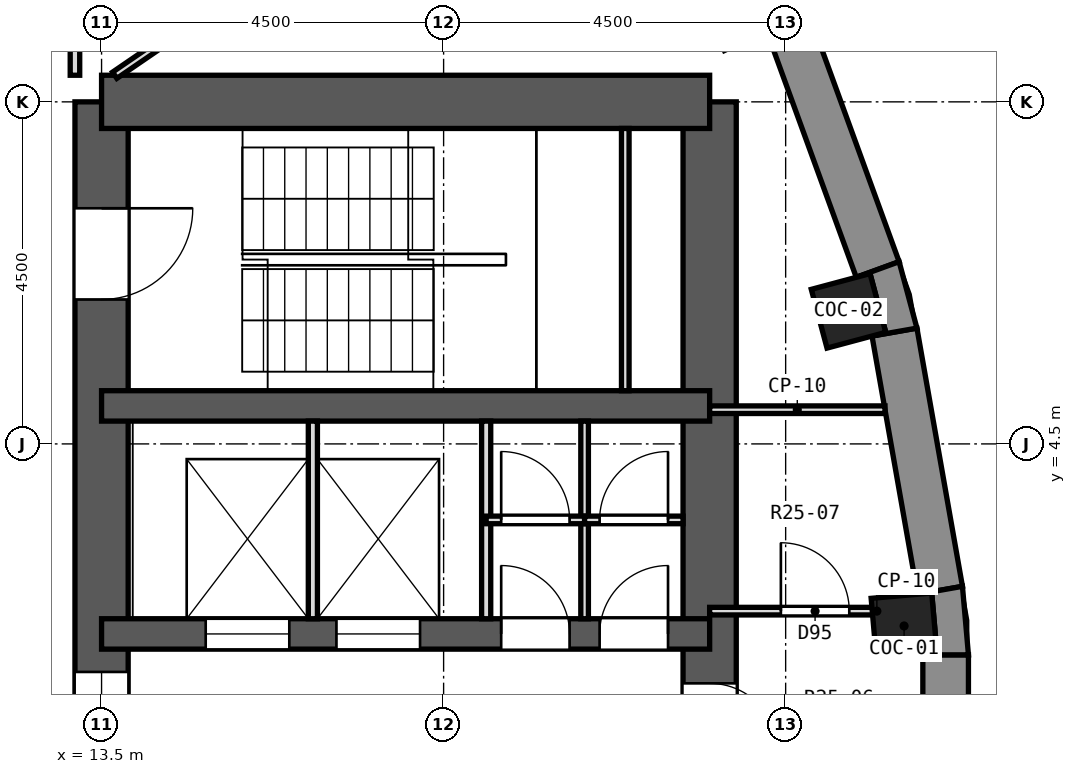
"""IFC4 building model, lengths in metres.
Left out: names, types, materials, properties, quantities, classifications, styles, units other than length and angle.
Written with IfcOpenShell. Run it as: python <this file> out.ifc"""

import sys

from ifc_helpers import new_model, si_unit, direction, frame, frame_2d, origin, origin_2d, place, context, subcontext, project, spatial, polyline, rectangle, outline, extrude, element, fill, save


model = new_model("IFC4")
c1 = context("Model", 3, precision=1e-05, world=origin(), true_north=direction((0.0, 1.0)))
c2 = subcontext(c1, "Body", "Model", "MODEL_VIEW")
j1 = project(units=[si_unit("LENGTHUNIT", "METRE"), si_unit("PLANEANGLEUNIT", "RADIAN")], contexts=[c1])
p1 = place(None, origin())
s1 = spatial("IfcSite", under=j1, at=p1, CompositionType="ELEMENT")
p2 = place(p1, origin())
s2 = spatial("IfcBuilding", under=s1, at=p2, CompositionType="ELEMENT")
p3 = place(p2, frame((0.0, 0.0, 160.8)))
s3 = spatial("IfcBuildingStorey", under=s2, at=p3, CompositionType="ELEMENT", Elevation=160.8)
for number, where, z_axis, x_axis in (
    (1, (24.058, 2.105, 0.0), (0.0, 0.0, 1.0), (0.996, 0.087, 0.0)),
    (2, (23.327, 6.25, 0.0), (0.0, 0.0, 1.0), (0.966, 0.259, 0.0)),
):
    element("IfcColumn", number, at=place(p3, frame(where, z_axis=z_axis, x_axis=x_axis)), inside=s3, PredefinedType="COLUMN", context=c2, shape_type="SweptSolid", body=[
        extrude(rectangle(XDim=0.8, YDim=0.8, at=origin_2d()), origin(), (0.0, 0.0, 1.0), 3.3),
    ])
p4 = place(p3, frame((13.5, -9.0, 0.0), z_axis=(0.0, 0.0, 1.0), x_axis=(0.0, 1.0, 0.0)))
e3 = element("IfcWall", 3, at=p4, inside=s3, PredefinedType="SHEAR", context=c2, shape_type="SweptSolid", body=[
    extrude(rectangle(XDim=18.0, YDim=0.7, at=frame_2d((9.0, 0.0))), origin(), (0.0, 0.0, 1.0), 3.3),
])
p5 = place(p4, frame((15.4, 0.0, 0.0)))
e4 = element("IfcOpeningElement", 4, at=p5, cuts=e3, PredefinedType="OPENING", context=c2, shape_type="SweptSolid", body=[
    extrude(rectangle(XDim=1.2, YDim=2.1, at=frame_2d((0.6, 1.05))), frame((0.0, 0.362, 0.0), z_axis=(0.0, -1.0, 0.0), x_axis=(1.0, 0.0, 0.0)), (0.0, 0.0, 1.0), 0.724),
])
p6 = place(p4, frame((1.4, 0.0, 0.0)))
e5 = element("IfcOpeningElement", 5, at=p6, cuts=e3, PredefinedType="OPENING", context=c2, shape_type="SweptSolid", body=[
    extrude(rectangle(XDim=1.2, YDim=2.1, at=frame_2d((0.6, 1.05))), frame((0.0, 0.362, 0.0), z_axis=(0.0, -1.0, 0.0), x_axis=(1.0, 0.0, 0.0)), (0.0, 0.0, 1.0), 0.724),
])
p7 = place(p4, frame((7.5, 0.0, 0.0)))
e6 = element("IfcOpeningElement", 6, at=p7, cuts=e3, PredefinedType="OPENING", context=c2, shape_type="SweptSolid", body=[
    extrude(rectangle(XDim=3.0, YDim=2.4, at=frame_2d((1.5, 1.2))), frame((0.0, 0.362, 0.0), z_axis=(0.0, -1.0, 0.0), x_axis=(1.0, 0.0, 0.0)), (0.0, 0.0, 1.0), 0.724),
])
p8 = place(p3, frame((21.5, -9.0, 0.0), z_axis=(0.0, 0.0, 1.0), x_axis=(0.0, 1.0, 0.0)))
e7 = element("IfcWall", 7, at=p8, inside=s3, PredefinedType="SHEAR", context=c2, shape_type="SweptSolid", body=[
    extrude(rectangle(XDim=18.0, YDim=0.7, at=frame_2d((9.0, 0.0))), origin(), (0.0, 0.0, 1.0), 3.3),
])
p9 = place(p8, frame((9.45, 0.0, 0.0)))
e8 = element("IfcOpeningElement", 8, at=p9, cuts=e7, PredefinedType="OPENING", context=c2, shape_type="SweptSolid", body=[
    extrude(rectangle(XDim=0.9, YDim=2.1, at=frame_2d((0.45, 1.05))), frame((0.0, 0.362, 0.0), z_axis=(0.0, -1.0, 0.0), x_axis=(1.0, 0.0, 0.0)), (0.0, 0.0, 1.0), 0.724),
])
p10 = place(p8, frame((7.65, 0.0, 0.0)))
e9 = element("IfcOpeningElement", 9, at=p10, cuts=e7, PredefinedType="OPENING", context=c2, shape_type="SweptSolid", body=[
    extrude(rectangle(XDim=0.9, YDim=2.1, at=frame_2d((0.45, 1.05))), frame((0.0, 0.362, 0.0), z_axis=(0.0, -1.0, 0.0), x_axis=(1.0, 0.0, 0.0)), (0.0, 0.0, 1.0), 0.724),
])
p11 = place(p3, frame((13.5, 9.0, 0.0), z_axis=(0.0, 0.0, 1.0), x_axis=(1.0, 0.0, 0.0)))
e10 = element("IfcWall", 10, at=p11, inside=s3, PredefinedType="SHEAR", context=c2, shape_type="SweptSolid", body=[
    extrude(rectangle(XDim=8.0, YDim=0.7, at=frame_2d((4.0, 0.0))), origin(), (0.0, 0.0, 1.0), 3.3),
])
p12 = place(p3, frame((13.5, 5.0, 0.0), z_axis=(0.0, 0.0, 1.0), x_axis=(1.0, 0.0, 0.0)))
e11 = element("IfcWall", 11, at=p12, inside=s3, PredefinedType="SHEAR", context=c2, shape_type="SweptSolid", body=[
    extrude(rectangle(XDim=8.0, YDim=0.4, at=frame_2d((4.0, 0.0))), origin(), (0.0, 0.0, 1.0), 3.3),
])
p13 = place(p3, frame((13.5, 2.0, 0.0), z_axis=(0.0, 0.0, 1.0), x_axis=(1.0, 0.0, 0.0)))
e12 = element("IfcWall", 12, at=p13, inside=s3, PredefinedType="SHEAR", context=c2, shape_type="SweptSolid", body=[
    extrude(rectangle(XDim=8.0, YDim=0.4, at=frame_2d((4.0, 0.0))), origin(), (0.0, 0.0, 1.0), 3.3),
])
p14 = place(p13, frame((1.37, 0.0, 0.0)))
e13 = element("IfcOpeningElement", 13, at=p14, cuts=e12, PredefinedType="OPENING", context=c2, shape_type="SweptSolid", body=[
    extrude(rectangle(XDim=1.1, YDim=2.1, at=frame_2d((0.55, 1.05))), frame((0.0, 0.212, 0.0), z_axis=(0.0, -1.0, 0.0), x_axis=(1.0, 0.0, 0.0)), (0.0, 0.0, 1.0), 0.424),
])
p15 = place(p13, frame((3.09, 0.0, 0.0)))
e14 = element("IfcOpeningElement", 14, at=p15, cuts=e12, PredefinedType="OPENING", context=c2, shape_type="SweptSolid", body=[
    extrude(rectangle(XDim=1.1, YDim=2.1, at=frame_2d((0.55, 1.05))), frame((0.0, 0.212, 0.0), z_axis=(0.0, -1.0, 0.0), x_axis=(1.0, 0.0, 0.0)), (0.0, 0.0, 1.0), 0.424),
])
p16 = place(p13, frame((5.258, 0.0, 0.0)))
e15 = element("IfcOpeningElement", 15, at=p16, cuts=e12, PredefinedType="OPENING", context=c2, shape_type="SweptSolid", body=[
    extrude(rectangle(XDim=0.9, YDim=2.1, at=frame_2d((0.45, 1.05))), frame((0.0, 0.212, 0.0), z_axis=(0.0, -1.0, 0.0), x_axis=(1.0, 0.0, 0.0)), (0.0, 0.0, 1.0), 0.424),
])
p17 = place(p13, frame((6.552, 0.0, 0.0)))
e16 = element("IfcOpeningElement", 16, at=p17, cuts=e12, PredefinedType="OPENING", context=c2, shape_type="SweptSolid", body=[
    extrude(rectangle(XDim=0.9, YDim=2.1, at=frame_2d((0.45, 1.05))), frame((0.0, 0.212, 0.0), z_axis=(0.0, -1.0, 0.0), x_axis=(1.0, 0.0, 0.0)), (0.0, 0.0, 1.0), 0.424),
])
for number, where, z_axis, x_axis in (
    (17, (24.531, 2.574, 0.0), (0.0, 0.0, 1.0), (-0.174, 0.985, 0.0)),
    (18, (23.711, 6.794, 0.0), (0.0, 0.0, 1.0), (-0.342, 0.94, 0.0)),
    (19, (24.605, -1.725, 0.0), (0.0, 0.0, 1.0), (0.0, 1.0, 0.0)),
):
    element("IfcWall", number, at=place(p3, frame(where, z_axis=z_axis, x_axis=x_axis)), inside=s3, PredefinedType="SOLIDWALL", context=c2, shape_type="SweptSolid", body=[
        extrude(rectangle(XDim=3.45, YDim=0.6, at=frame_2d((1.725, 0.0))), origin(), (0.0, 0.0, 1.0), 2.85),
    ])
p18 = place(p3, origin())
e20 = element("IfcWall", 20, at=p18, inside=s3, PredefinedType="SOLIDWALL", context=c2, shape_type="SweptSolid", body=[
    extrude(outline(polyline([(24.905, 1.725), (24.826, 2.626), (24.235, 2.522), (24.422, 2.538), (24.491, 1.741), (24.305, 1.725), (24.905, 1.725)])), origin(), (0.0, 0.0, 1.0), 2.85),
])
p19 = place(p3, origin())
e21 = element("IfcWall", 21, at=p19, inside=s3, PredefinedType="SOLIDWALL", context=c2, shape_type="SweptSolid", body=[
    extrude(outline(polyline([(24.227, 6.023), (23.993, 6.897), (23.429, 6.692), (23.61, 6.74), (23.817, 5.968), (23.636, 5.919), (24.227, 6.023)])), origin(), (0.0, 0.0, 1.0), 2.85),
])
p20 = place(p3, frame((13.673, 9.35, 0.0), z_axis=(0.0, 0.0, 1.0), x_axis=(0.82545226585, 0.564471927382, 0.0)))
e22 = element("IfcWall", 22, at=p20, inside=s3, PredefinedType="PARTITIONING", context=c2, shape_type="SweptSolid", body=[
    extrude(rectangle(XDim=2.395, YDim=0.1, at=frame_2d((1.197, 0.0))), origin(), (0.0, 0.0, 1.0), 2.85),
])
p21 = place(p3, frame((13.15, 9.35, 0.0), z_axis=(0.0, 0.0, 1.0), x_axis=(0.0, 1.0, 0.0)))
e23 = element("IfcWall", 23, at=p21, inside=s3, PredefinedType="PARTITIONING", context=c2, shape_type="SweptSolid", body=[
    extrude(rectangle(XDim=2.221, YDim=0.125, at=frame_2d((1.111, 0.0))), origin(), (0.0, 0.0, 1.0), 2.85),
])
p22 = place(p3, frame((21.5, 4.95, 0.0), z_axis=(0.0, 0.0, 1.0), x_axis=(1.0, 0.0, 0.0)))
e24 = element("IfcWall", 24, at=p22, inside=s3, PredefinedType="PARTITIONING", context=c2, shape_type="SweptSolid", body=[
    extrude(rectangle(XDim=2.307, YDim=0.1, at=frame_2d((1.153, 0.0))), origin(), (0.0, 0.0, 1.0), 2.85),
])
p23 = place(p3, frame((21.5, 2.3, 0.0), z_axis=(0.0, 0.0, 1.0), x_axis=(1.0, 0.0, 0.0)))
e25 = element("IfcWall", 25, at=p23, inside=s3, PredefinedType="PARTITIONING", context=c2, shape_type="SweptSolid", body=[
    extrude(rectangle(XDim=2.774, YDim=0.1, at=frame_2d((1.387, 0.0))), origin(), (0.0, 0.0, 1.0), 2.85),
])
p24 = place(p23, frame((0.937, 0.0, 0.0)))
e26 = element("IfcOpeningElement", 26, at=p24, cuts=e25, PredefinedType="OPENING", context=c2, shape_type="SweptSolid", body=[
    extrude(rectangle(XDim=0.9, YDim=2.1, at=frame_2d((0.45, 1.05))), frame((0.0, 0.062, 0.0), z_axis=(0.0, -1.0, 0.0), x_axis=(1.0, 0.0, 0.0)), (0.0, 0.0, 1.0), 0.124),
])
for number, where, z_axis, x_axis in (
    (27, (16.28, 2.2, 0.0), (0.0, 0.0, 1.0), (0.0, 1.0, 0.0)),
    (28, (18.56, 2.2, 0.0), (0.0, 0.0, 1.0), (0.0, 1.0, 0.0)),
):
    element("IfcWall", number, at=place(p3, frame(where, z_axis=z_axis, x_axis=x_axis)), inside=s3, PredefinedType="PARTITIONING", context=c2, shape_type="SweptSolid", body=[
        extrude(rectangle(XDim=2.6, YDim=0.12, at=frame_2d((1.3, 0.0))), origin(), (0.0, 0.0, 1.0), 2.85),
    ])
p25 = place(p3, frame((19.855, 2.2, 0.0), z_axis=(0.0, 0.0, 1.0), x_axis=(0.0, 1.0, 0.0)))
e29 = element("IfcWall", 29, at=p25, inside=s3, PredefinedType="PARTITIONING", context=c2, shape_type="SweptSolid", body=[
    extrude(rectangle(XDim=2.6, YDim=0.1, at=frame_2d((1.3, 0.0))), origin(), (0.0, 0.0, 1.0), 2.85),
])
p26 = place(p3, frame((18.56, 3.5, 0.0), z_axis=(0.0, 0.0, 1.0), x_axis=(1.0, 0.0, 0.0)))
e30 = element("IfcWall", 30, at=p26, inside=s3, PredefinedType="PARTITIONING", context=c2, shape_type="SweptSolid", body=[
    extrude(rectangle(XDim=1.295, YDim=0.1, at=frame_2d((0.647, 0.0))), origin(), (0.0, 0.0, 1.0), 2.85),
])
p27 = place(p26, frame((0.198, 0.0, 0.0)))
e31 = element("IfcOpeningElement", 31, at=p27, cuts=e30, PredefinedType="OPENING", context=c2, shape_type="SweptSolid", body=[
    extrude(rectangle(XDim=0.9, YDim=2.1, at=frame_2d((0.45, 1.05))), frame((0.0, 0.062, 0.0), z_axis=(0.0, -1.0, 0.0), x_axis=(1.0, 0.0, 0.0)), (0.0, 0.0, 1.0), 0.124),
])
p28 = place(p3, frame((19.855, 3.5, 0.0), z_axis=(0.0, 0.0, 1.0), x_axis=(1.0, 0.0, 0.0)))
e32 = element("IfcWall", 32, at=p28, inside=s3, PredefinedType="PARTITIONING", context=c2, shape_type="SweptSolid", body=[
    extrude(rectangle(XDim=1.295, YDim=0.1, at=frame_2d((0.647, 0.0))), origin(), (0.0, 0.0, 1.0), 2.85),
])
p29 = place(p28, frame((0.198, 0.0, 0.0)))
e33 = element("IfcOpeningElement", 33, at=p29, cuts=e32, PredefinedType="OPENING", context=c2, shape_type="SweptSolid", body=[
    extrude(rectangle(XDim=0.9, YDim=2.1, at=frame_2d((0.45, 1.05))), frame((0.0, 0.062, 0.0), z_axis=(0.0, -1.0, 0.0), x_axis=(1.0, 0.0, 0.0)), (0.0, 0.0, 1.0), 0.124),
])
p30 = place(p3, frame((20.39, 5.2, 0.0), z_axis=(0.0, 0.0, 1.0), x_axis=(0.0, 1.0, 0.0)))
e34 = element("IfcWall", 34, at=p30, inside=s3, PredefinedType="PARTITIONING", context=c2, shape_type="SweptSolid", body=[
    extrude(rectangle(XDim=3.45, YDim=0.1, at=frame_2d((1.725, 0.0))), origin(), (0.0, 0.0, 1.0), 2.85),
])
p31 = place(p14, origin())
e35 = element("IfcDoor", 35, at=p31, inside=s3, OperationType="DOUBLE_DOOR_SLIDING", PredefinedType="DOOR", context=c2, shape_type="SweptSolid", body=[
    extrude(rectangle(XDim=1.1, YDim=2.1, at=frame_2d((0.55, 1.05))), frame((0.0, 0.025, 0.0), z_axis=(0.0, -1.0, 0.0), x_axis=(1.0, 0.0, 0.0)), (0.0, 0.0, 1.0), 0.05),
])
fill(e13, e35)
p32 = place(p15, origin())
e36 = element("IfcDoor", 36, at=p32, inside=s3, OperationType="DOUBLE_DOOR_SLIDING", PredefinedType="DOOR", context=c2, shape_type="SweptSolid", body=[
    extrude(rectangle(XDim=1.1, YDim=2.1, at=frame_2d((0.55, 1.05))), frame((0.0, 0.025, 0.0), z_axis=(0.0, -1.0, 0.0), x_axis=(1.0, 0.0, 0.0)), (0.0, 0.0, 1.0), 0.05),
])
fill(e14, e36)
p33 = place(p16, origin())
e37 = element("IfcDoor", 37, at=p33, inside=s3, OperationType="SINGLE_SWING_LEFT", PredefinedType="DOOR", context=c2, shape_type="SweptSolid", body=[
    extrude(rectangle(XDim=0.9, YDim=2.1, at=frame_2d((0.45, 1.05))), frame((0.0, 0.025, 0.0), z_axis=(0.0, -1.0, 0.0), x_axis=(1.0, 0.0, 0.0)), (0.0, 0.0, 1.0), 0.05),
])
fill(e15, e37)
p34 = place(p17, origin())
e38 = element("IfcDoor", 38, at=p34, inside=s3, OperationType="SINGLE_SWING_RIGHT", PredefinedType="DOOR", context=c2, shape_type="SweptSolid", body=[
    extrude(rectangle(XDim=0.9, YDim=2.1, at=frame_2d((0.45, 1.05))), frame((0.0, 0.025, 0.0), z_axis=(0.0, -1.0, 0.0), x_axis=(1.0, 0.0, 0.0)), (0.0, 0.0, 1.0), 0.05),
])
fill(e16, e38)
p35 = place(p24, origin())
e39 = element("IfcDoor", 39, at=p35, inside=s3, OperationType="SINGLE_SWING_LEFT", PredefinedType="DOOR", context=c2, shape_type="SweptSolid", body=[
    extrude(rectangle(XDim=0.9, YDim=2.1, at=frame_2d((0.45, 1.05))), frame((0.0, 0.025, 0.0), z_axis=(0.0, -1.0, 0.0), x_axis=(1.0, 0.0, 0.0)), (0.0, 0.0, 1.0), 0.05),
])
fill(e26, e39)
p36 = place(p9, frame((0.9, 0.0, 0.0), z_axis=(0.0, 0.0, 1.0), x_axis=(-1.0, 0.0, 0.0)))
e40 = element("IfcDoor", 40, at=p36, inside=s3, OperationType="SINGLE_SWING_RIGHT", PredefinedType="DOOR", context=c2, shape_type="SweptSolid", body=[
    extrude(rectangle(XDim=0.9, YDim=2.1, at=frame_2d((0.45, 1.05))), frame((0.0, 0.025, 0.0), z_axis=(0.0, -1.0, 0.0), x_axis=(1.0, 0.0, 0.0)), (0.0, 0.0, 1.0), 0.05),
])
fill(e8, e40)
p37 = place(p27, origin())
e41 = element("IfcDoor", 41, at=p37, inside=s3, OperationType="SINGLE_SWING_LEFT", PredefinedType="DOOR", context=c2, shape_type="SweptSolid", body=[
    extrude(rectangle(XDim=0.9, YDim=2.1, at=frame_2d((0.45, 1.05))), frame((0.0, 0.025, 0.0), z_axis=(0.0, -1.0, 0.0), x_axis=(1.0, 0.0, 0.0)), (0.0, 0.0, 1.0), 0.05),
])
fill(e31, e41)
p38 = place(p29, origin())
e42 = element("IfcDoor", 42, at=p38, inside=s3, OperationType="SINGLE_SWING_RIGHT", PredefinedType="DOOR", context=c2, shape_type="SweptSolid", body=[
    extrude(rectangle(XDim=0.9, YDim=2.1, at=frame_2d((0.45, 1.05))), frame((0.0, 0.025, 0.0), z_axis=(0.0, -1.0, 0.0), x_axis=(1.0, 0.0, 0.0)), (0.0, 0.0, 1.0), 0.05),
])
fill(e33, e42)
p39 = place(p5, frame((1.2, 0.0, 0.0), z_axis=(0.0, 0.0, 1.0), x_axis=(-1.0, 0.0, 0.0)))
e43 = element("IfcDoor", 43, at=p39, inside=s3, OperationType="SINGLE_SWING_LEFT", PredefinedType="DOOR", context=c2, shape_type="SweptSolid", body=[
    extrude(rectangle(XDim=1.2, YDim=2.1, at=frame_2d((0.6, 1.05))), frame((0.0, 0.025, 0.0), z_axis=(0.0, -1.0, 0.0), x_axis=(1.0, 0.0, 0.0)), (0.0, 0.0, 1.0), 0.05),
])
fill(e4, e43)
p40 = place(p7, origin())
e44 = element("IfcDoor", 44, at=p40, inside=s3, OperationType="DOUBLE_DOOR_SLIDING", PredefinedType="DOOR", context=c2, shape_type="SweptSolid", body=[
    extrude(rectangle(XDim=3.0, YDim=2.4, at=frame_2d((1.5, 1.2))), frame((0.0, 0.025, 0.0), z_axis=(0.0, -1.0, 0.0), x_axis=(1.0, 0.0, 0.0)), (0.0, 0.0, 1.0), 0.05),
])
fill(e6, e44)
save(model, sys.argv[1])
